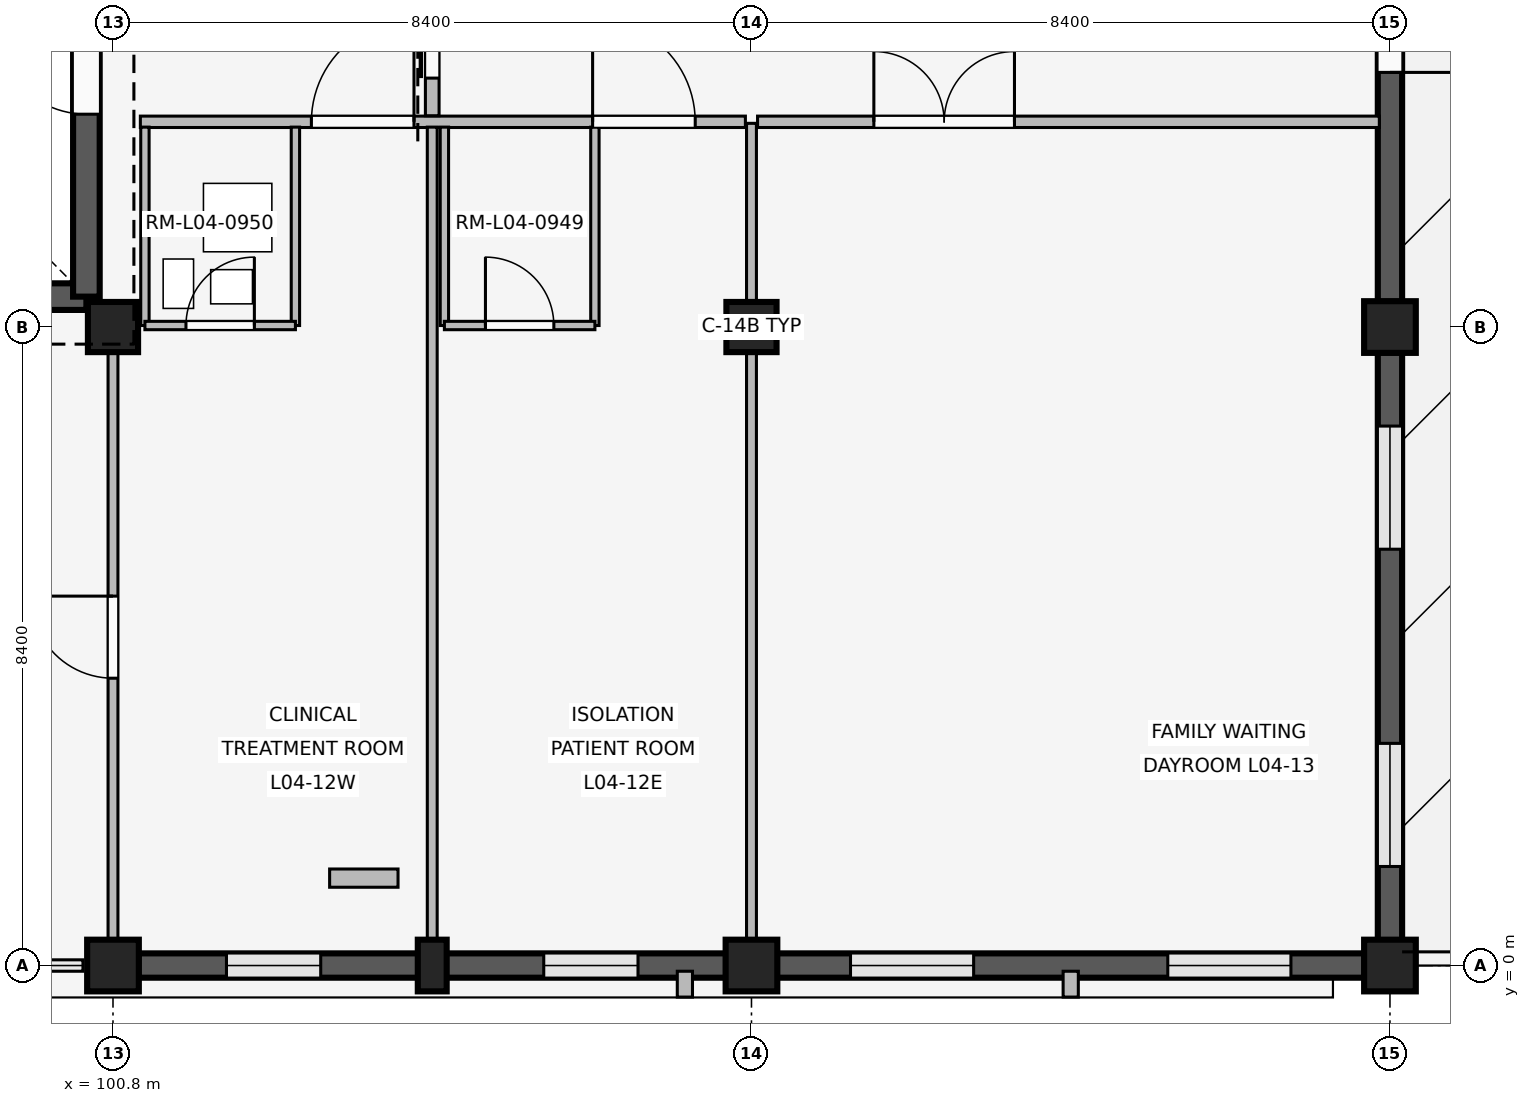
"""IFC4 building model, lengths in metres.
Left out: names, types, materials, properties, quantities, classifications, styles, units other than length and angle.
Written with IfcOpenShell. Run it as: python <this file> out.ifc"""

import sys

from ifc_helpers import new_model, si_unit, direction, frame, frame_2d, origin, origin_2d, place, context, subcontext, project, spatial, rectangle, extrude, element, fill, save


model = new_model("IFC4")
c1 = context("Model", 3, precision=1e-05, world=origin(), true_north=direction((0.0, 1.0)))
c2 = subcontext(c1, "Body", "Model", "MODEL_VIEW")
j1 = project(units=[si_unit("LENGTHUNIT", "METRE"), si_unit("PLANEANGLEUNIT", "RADIAN")], contexts=[c1])
p1 = place(None, origin())
s1 = spatial("IfcSite", under=j1, at=p1, CompositionType="ELEMENT")
p2 = place(p1, origin())
s2 = spatial("IfcBuilding", under=s1, at=p2, CompositionType="ELEMENT")
p3 = place(p2, frame((0.0, 0.0, 16.2)))
s3 = spatial("IfcBuildingStorey", under=s2, at=p3, CompositionType="ELEMENT", Elevation=16.2)
p4 = place(p3, frame((100.8, 0.0, 0.0), z_axis=(0.0, 0.0, 1.0), x_axis=(1.0, 0.0, 0.0)))
e1 = element("IfcColumn", 1, at=p4, inside=s3, PredefinedType="COLUMN", context=c2, shape_type="SweptSolid", body=[
    extrude(rectangle(XDim=0.68, YDim=0.68, at=origin_2d()), origin(), (0.0, 0.0, 1.0), 4.2),
])
p5 = place(p3, frame((100.8, 8.4, 0.0), z_axis=(0.0, 0.0, 1.0), x_axis=(1.0, 0.0, 0.0)))
e2 = element("IfcColumn", 2, at=p5, inside=s3, PredefinedType="COLUMN", context=c2, shape_type="SweptSolid", body=[
    extrude(rectangle(XDim=0.66, YDim=0.66, at=origin_2d()), origin(), (0.0, 0.0, 1.0), 4.2),
])
p6 = place(p3, frame((109.2, 0.0, 0.0), z_axis=(0.0, 0.0, 1.0), x_axis=(1.0, 0.0, 0.0)))
e3 = element("IfcColumn", 3, at=p6, inside=s3, PredefinedType="COLUMN", context=c2, shape_type="SweptSolid", body=[
    extrude(rectangle(XDim=0.68, YDim=0.68, at=origin_2d()), origin(), (0.0, 0.0, 1.0), 4.2),
])
p7 = place(p3, frame((109.2, 8.4, 0.0), z_axis=(0.0, 0.0, 1.0), x_axis=(1.0, 0.0, 0.0)))
e4 = element("IfcColumn", 4, at=p7, inside=s3, PredefinedType="COLUMN", context=c2, shape_type="SweptSolid", body=[
    extrude(rectangle(XDim=0.66, YDim=0.66, at=origin_2d()), origin(), (0.0, 0.0, 1.0), 4.2),
])
for number, where, z_axis, x_axis in (
    (5, (117.6, 0.0, 0.0), (0.0, 0.0, 1.0), (1.0, 0.0, 0.0)),
    (6, (117.6, 8.4, 0.0), (0.0, 0.0, 1.0), (1.0, 0.0, 0.0)),
):
    element("IfcColumn", number, at=place(p3, frame(where, z_axis=z_axis, x_axis=x_axis)), inside=s3, PredefinedType="COLUMN", context=c2, shape_type="SweptSolid", body=[
        extrude(rectangle(XDim=0.68, YDim=0.68, at=origin_2d()), origin(), (0.0, 0.0, 1.0), 4.2),
    ])
p8 = place(p3, frame((105.0, 0.0, 0.0), z_axis=(0.0, 0.0, 1.0), x_axis=(1.0, 0.0, 0.0)))
e7 = element("IfcColumn", 7, at=p8, inside=s3, PredefinedType="PILASTER", context=c2, shape_type="SweptSolid", body=[
    extrude(rectangle(XDim=0.38, YDim=0.68, at=origin_2d()), origin(), (0.0, 0.0, 1.0), 4.2),
])
p9 = place(p3, frame((108.865, 0.0, 0.0), z_axis=(0.0, 0.0, 1.0), x_axis=(-1.0, 0.0, 0.0)))
e8 = element("IfcWall", 8, at=p9, inside=s3, PredefinedType="SOLIDWALL", context=c2, shape_type="SweptSolid", body=[
    extrude(rectangle(XDim=7.73, YDim=0.32, at=frame_2d((3.865, 0.0))), origin(), (0.0, 0.0, 1.0), 3.32),
])
p10 = place(p9, frame((1.158, 0.0, 0.85)))
e9 = element("IfcOpeningElement", 9, at=p10, cuts=e8, PredefinedType="OPENING", context=c2, shape_type="SweptSolid", body=[
    extrude(rectangle(XDim=1.24, YDim=1.34, at=frame_2d((0.62, 0.67))), frame((0.0, 0.17, 0.0), z_axis=(0.0, -1.0, 0.0), x_axis=(1.0, 0.0, 0.0)), (0.0, 0.0, 1.0), 0.34),
])
p11 = place(p9, frame((5.332, 0.0, 0.85)))
e10 = element("IfcOpeningElement", 10, at=p11, cuts=e8, PredefinedType="OPENING", context=c2, shape_type="SweptSolid", body=[
    extrude(rectangle(XDim=1.24, YDim=1.34, at=frame_2d((0.62, 0.67))), frame((0.0, 0.17, 0.0), z_axis=(0.0, -1.0, 0.0), x_axis=(1.0, 0.0, 0.0)), (0.0, 0.0, 1.0), 0.34),
])
p12 = place(p3, frame((108.324, -0.075, 0.0), z_axis=(0.0, 0.0, 1.0), x_axis=(0.0, -1.0, 0.0)))
e11 = element("IfcWall", 11, at=p12, inside=s3, PredefinedType="ELEMENTEDWALL", context=c2, shape_type="SweptSolid", body=[
    extrude(rectangle(XDim=0.34, YDim=0.2, at=frame_2d((0.17, 0.0))), origin(), (0.0, 0.0, 1.0), 3.3),
])
p13 = place(p3, frame((117.265, 0.0, 0.0), z_axis=(0.0, 0.0, 1.0), x_axis=(-1.0, 0.0, 0.0)))
e12 = element("IfcWall", 12, at=p13, inside=s3, PredefinedType="SOLIDWALL", context=c2, shape_type="SweptSolid", body=[
    extrude(rectangle(XDim=7.73, YDim=0.32, at=frame_2d((3.865, 0.0))), origin(), (0.0, 0.0, 1.0), 3.32),
])
p14 = place(p13, frame((0.968, 0.0, 0.85)))
e13 = element("IfcOpeningElement", 13, at=p14, cuts=e12, PredefinedType="OPENING", context=c2, shape_type="SweptSolid", body=[
    extrude(rectangle(XDim=1.62, YDim=1.52, at=frame_2d((0.81, 0.76))), frame((0.0, 0.17, 0.0), z_axis=(0.0, -1.0, 0.0), x_axis=(1.0, 0.0, 0.0)), (0.0, 0.0, 1.0), 0.34),
])
p15 = place(p13, frame((5.142, 0.0, 0.85)))
e14 = element("IfcOpeningElement", 14, at=p15, cuts=e12, PredefinedType="OPENING", context=c2, shape_type="SweptSolid", body=[
    extrude(rectangle(XDim=1.62, YDim=1.52, at=frame_2d((0.81, 0.76))), frame((0.0, 0.17, 0.0), z_axis=(0.0, -1.0, 0.0), x_axis=(1.0, 0.0, 0.0)), (0.0, 0.0, 1.0), 0.34),
])
p16 = place(p3, frame((113.4, -0.075, 0.0), z_axis=(0.0, 0.0, 1.0), x_axis=(0.0, -1.0, 0.0)))
e15 = element("IfcWall", 15, at=p16, inside=s3, PredefinedType="ELEMENTEDWALL", context=c2, shape_type="SweptSolid", body=[
    extrude(rectangle(XDim=0.34, YDim=0.2, at=frame_2d((0.17, 0.0))), origin(), (0.0, 0.0, 1.0), 3.3),
])
p17 = place(p3, frame((117.6, 8.065, 0.0), z_axis=(0.0, 0.0, 1.0), x_axis=(0.0, -1.0, 0.0)))
e16 = element("IfcWall", 16, at=p17, inside=s3, PredefinedType="SOLIDWALL", context=c2, shape_type="SweptSolid", body=[
    extrude(rectangle(XDim=7.73, YDim=0.32, at=frame_2d((3.865, 0.0))), origin(), (0.0, 0.0, 1.0), 3.32),
])
p18 = place(p17, frame((0.968, 0.0, 0.85)))
e17 = element("IfcOpeningElement", 17, at=p18, cuts=e16, PredefinedType="OPENING", context=c2, shape_type="SweptSolid", body=[
    extrude(rectangle(XDim=1.62, YDim=1.52, at=frame_2d((0.81, 0.76))), frame((0.0, 0.17, 0.0), z_axis=(0.0, -1.0, 0.0), x_axis=(1.0, 0.0, 0.0)), (0.0, 0.0, 1.0), 0.34),
])
p19 = place(p17, frame((5.142, 0.0, 0.85)))
e18 = element("IfcOpeningElement", 18, at=p19, cuts=e16, PredefinedType="OPENING", context=c2, shape_type="SweptSolid", body=[
    extrude(rectangle(XDim=1.62, YDim=1.52, at=frame_2d((0.81, 0.76))), frame((0.0, 0.17, 0.0), z_axis=(0.0, -1.0, 0.0), x_axis=(1.0, 0.0, 0.0)), (0.0, 0.0, 1.0), 0.34),
])
p20 = place(p3, frame((117.6, 16.465, 0.0), z_axis=(0.0, 0.0, 1.0), x_axis=(0.0, -1.0, 0.0)))
e19 = element("IfcWall", 19, at=p20, inside=s3, PredefinedType="SOLIDWALL", context=c2, shape_type="SweptSolid", body=[
    extrude(rectangle(XDim=7.73, YDim=0.32, at=frame_2d((3.865, 0.0))), origin(), (0.0, 0.0, 1.0), 3.32),
])
p21 = place(p20, frame((3.015, 0.0, 0.0)))
e20 = element("IfcOpeningElement", 20, at=p21, cuts=e19, PredefinedType="OPENING", context=c2, shape_type="SweptSolid", body=[
    extrude(rectangle(XDim=1.7, YDim=2.3, at=frame_2d((0.85, 1.15))), frame((0.0, 0.17, 0.0), z_axis=(0.0, -1.0, 0.0), x_axis=(1.0, 0.0, 0.0)), (0.0, 0.0, 1.0), 0.34),
])
p22 = place(p3, frame((92.95, 8.8, 0.0), z_axis=(0.0, 0.0, 1.0), x_axis=(1.0, 0.0, 0.0)))
e21 = element("IfcWall", 21, at=p22, inside=s3, PredefinedType="SHEAR", context=c2, shape_type="SweptSolid", body=[
    extrude(rectangle(XDim=7.5, YDim=0.35, at=frame_2d((3.75, 0.0))), origin(), (0.0, 0.0, 1.0), 3.92),
])
p23 = place(p22, frame((4.85, 0.0, 0.0)))
e22 = element("IfcOpeningElement", 22, at=p23, cuts=e21, PredefinedType="OPENING", context=c2, shape_type="SweptSolid", body=[
    extrude(rectangle(XDim=1.2, YDim=2.2, at=frame_2d((0.6, 1.1))), frame((0.0, 0.185, 0.0), z_axis=(0.0, -1.0, 0.0), x_axis=(1.0, 0.0, 0.0)), (0.0, 0.0, 1.0), 0.37),
])
p24 = place(p3, frame((100.45, 8.8, 0.0), z_axis=(0.0, 0.0, 1.0), x_axis=(0.0, 1.0, 0.0)))
e23 = element("IfcWall", 23, at=p24, inside=s3, PredefinedType="SHEAR", context=c2, shape_type="SweptSolid", body=[
    extrude(rectangle(XDim=7.55, YDim=0.35, at=frame_2d((3.775, 0.0))), origin(), (0.0, 0.0, 1.0), 3.92),
])
p25 = place(p24, frame((2.4, 0.0, 0.0)))
e24 = element("IfcOpeningElement", 24, at=p25, cuts=e23, PredefinedType="OPENING", context=c2, shape_type="SweptSolid", body=[
    extrude(rectangle(XDim=1.2, YDim=2.2, at=frame_2d((0.6, 1.1))), frame((0.0, 0.185, 0.0), z_axis=(0.0, -1.0, 0.0), x_axis=(1.0, 0.0, 0.0)), (0.0, 0.0, 1.0), 0.37),
])
p26 = place(p3, frame((100.8, 0.14, 0.0), z_axis=(0.0, 0.0, 1.0), x_axis=(0.0, 1.0, 0.0)))
e25 = element("IfcWall", 25, at=p26, inside=s3, PredefinedType="PARTITIONING", context=c2, shape_type="SweptSolid", body=[
    extrude(rectangle(XDim=8.21, YDim=0.13, at=frame_2d((4.105, 0.0))), origin(), (0.0, 0.0, 1.0), 3.3),
])
p27 = place(p26, frame((3.64, 0.0, 0.0)))
e26 = element("IfcOpeningElement", 26, at=p27, cuts=e25, PredefinedType="OPENING", context=c2, shape_type="SweptSolid", body=[
    extrude(rectangle(XDim=1.08, YDim=2.15, at=frame_2d((0.54, 1.075))), frame((0.0, 0.075, 0.0), z_axis=(0.0, -1.0, 0.0), x_axis=(1.0, 0.0, 0.0)), (0.0, 0.0, 1.0), 0.15),
])
p28 = place(p3, frame((101.16, 11.1, 0.0), z_axis=(0.0, 0.0, 1.0), x_axis=(1.0, 0.0, 0.0)))
e27 = element("IfcWall", 27, at=p28, inside=s3, PredefinedType="PARTITIONING", context=c2, shape_type="SweptSolid", body=[
    extrude(rectangle(XDim=7.96, YDim=0.15, at=frame_2d((3.98, 0.0))), origin(), (0.0, 0.0, 1.0), 3.3),
])
p29 = place(p28, frame((2.25, 0.0, 0.0)))
e28 = element("IfcOpeningElement", 28, at=p29, cuts=e27, PredefinedType="OPENING", context=c2, shape_type="SweptSolid", body=[
    extrude(rectangle(XDim=1.35, YDim=2.25, at=frame_2d((0.675, 1.125))), frame((0.0, 0.085, 0.0), z_axis=(0.0, -1.0, 0.0), x_axis=(1.0, 0.0, 0.0)), (0.0, 0.0, 1.0), 0.17),
])
p30 = place(p28, frame((5.95, 0.0, 0.0)))
e29 = element("IfcOpeningElement", 29, at=p30, cuts=e27, PredefinedType="OPENING", context=c2, shape_type="SweptSolid", body=[
    extrude(rectangle(XDim=1.35, YDim=2.25, at=frame_2d((0.675, 1.125))), frame((0.0, 0.085, 0.0), z_axis=(0.0, -1.0, 0.0), x_axis=(1.0, 0.0, 0.0)), (0.0, 0.0, 1.0), 0.17),
])
p31 = place(p3, frame((105.0, 0.1, 0.0), z_axis=(0.0, 0.0, 1.0), x_axis=(0.0, 1.0, 0.0)))
e30 = element("IfcWall", 30, at=p31, inside=s3, PredefinedType="PARTITIONING", context=c2, shape_type="SweptSolid", body=[
    extrude(rectangle(XDim=10.93, YDim=0.13, at=frame_2d((5.465, 0.0))), origin(), (0.0, 0.0, 1.0), 3.3),
])
for number, where, z_axis, x_axis in (
    (31, (101.22, 8.42, 0.0), (0.0, 0.0, 1.0), (0.0, 1.0, 0.0)),
    (32, (103.2, 8.42, 0.0), (0.0, 0.0, 1.0), (0.0, 1.0, 0.0)),
):
    element("IfcWall", number, at=place(p3, frame(where, z_axis=z_axis, x_axis=x_axis)), inside=s3, PredefinedType="PARTITIONING", context=c2, shape_type="SweptSolid", body=[
        extrude(rectangle(XDim=2.61, YDim=0.11, at=frame_2d((1.305, 0.0))), origin(), (0.0, 0.0, 1.0), 3.3),
    ])
p32 = place(p3, frame((101.22, 8.42, 0.0), z_axis=(0.0, 0.0, 1.0), x_axis=(1.0, 0.0, 0.0)))
e33 = element("IfcWall", 33, at=p32, inside=s3, PredefinedType="PARTITIONING", context=c2, shape_type="SweptSolid", body=[
    extrude(rectangle(XDim=1.98, YDim=0.11, at=frame_2d((0.99, 0.0))), origin(), (0.0, 0.0, 1.0), 3.3),
])
p33 = place(p32, frame((0.54, 0.0, 0.0)))
e34 = element("IfcOpeningElement", 34, at=p33, cuts=e33, PredefinedType="OPENING", context=c2, shape_type="SweptSolid", body=[
    extrude(rectangle(XDim=0.9, YDim=2.1, at=frame_2d((0.45, 1.05))), frame((0.0, 0.065, 0.0), z_axis=(0.0, -1.0, 0.0), x_axis=(1.0, 0.0, 0.0)), (0.0, 0.0, 1.0), 0.13),
])
for number, where, z_axis, x_axis in (
    (35, (105.16, 8.42, 0.0), (0.0, 0.0, 1.0), (0.0, 1.0, 0.0)),
    (36, (107.14, 8.42, 0.0), (0.0, 0.0, 1.0), (0.0, 1.0, 0.0)),
):
    element("IfcWall", number, at=place(p3, frame(where, z_axis=z_axis, x_axis=x_axis)), inside=s3, PredefinedType="PARTITIONING", context=c2, shape_type="SweptSolid", body=[
        extrude(rectangle(XDim=2.61, YDim=0.11, at=frame_2d((1.305, 0.0))), origin(), (0.0, 0.0, 1.0), 3.3),
    ])
p34 = place(p3, frame((105.16, 8.42, 0.0), z_axis=(0.0, 0.0, 1.0), x_axis=(1.0, 0.0, 0.0)))
e37 = element("IfcWall", 37, at=p34, inside=s3, PredefinedType="PARTITIONING", context=c2, shape_type="SweptSolid", body=[
    extrude(rectangle(XDim=1.98, YDim=0.11, at=frame_2d((0.99, 0.0))), origin(), (0.0, 0.0, 1.0), 3.3),
])
p35 = place(p34, frame((0.54, 0.0, 0.0)))
e38 = element("IfcOpeningElement", 38, at=p35, cuts=e37, PredefinedType="OPENING", context=c2, shape_type="SweptSolid", body=[
    extrude(rectangle(XDim=0.9, YDim=2.1, at=frame_2d((0.45, 1.05))), frame((0.0, 0.065, 0.0), z_axis=(0.0, -1.0, 0.0), x_axis=(1.0, 0.0, 0.0)), (0.0, 0.0, 1.0), 0.13),
])
p36 = place(p3, frame((103.65, 1.15, 0.0), z_axis=(0.0, 0.0, 1.0), x_axis=(1.0, 0.0, 0.0)))
e39 = element("IfcWall", 39, at=p36, inside=s3, PredefinedType="PLUMBINGWALL", context=c2, shape_type="SweptSolid", body=[
    extrude(rectangle(XDim=0.9, YDim=0.24, at=frame_2d((0.45, 0.0))), origin(), (0.0, 0.0, 1.0), 3.3),
])
p37 = place(p3, frame((105.0, 11.18, 0.0), z_axis=(0.0, 0.0, 1.0), x_axis=(0.0, 1.0, 0.0)))
e40 = element("IfcWall", 40, at=p37, inside=s3, PredefinedType="PARTITIONING", context=c2, shape_type="SweptSolid", body=[
    extrude(rectangle(XDim=2.84, YDim=0.18, at=frame_2d((1.42, 0.0))), origin(), (0.0, 0.0, 1.0), 3.3),
])
p38 = place(p37, frame((0.495, 0.0, 0.0)))
e41 = element("IfcOpeningElement", 41, at=p38, cuts=e40, PredefinedType="OPENING", context=c2, shape_type="SweptSolid", body=[
    extrude(rectangle(XDim=1.85, YDim=2.3, at=frame_2d((0.925, 1.15))), frame((0.0, 0.1, 0.0), z_axis=(0.0, -1.0, 0.0), x_axis=(1.0, 0.0, 0.0)), (0.0, 0.0, 1.0), 0.2),
])
p39 = place(p3, frame((109.2, 0.14, 0.0), z_axis=(0.0, 0.0, 1.0), x_axis=(0.0, 1.0, 0.0)))
e42 = element("IfcWall", 42, at=p39, inside=s3, PredefinedType="PARTITIONING", context=c2, shape_type="SweptSolid", body=[
    extrude(rectangle(XDim=10.94, YDim=0.13, at=frame_2d((5.47, 0.0))), origin(), (0.0, 0.0, 1.0), 3.3),
])
p40 = place(p3, frame((109.28, 11.1, 0.0), z_axis=(0.0, 0.0, 1.0), x_axis=(1.0, 0.0, 0.0)))
e43 = element("IfcWall", 43, at=p40, inside=s3, PredefinedType="PARTITIONING", context=c2, shape_type="SweptSolid", body=[
    extrude(rectangle(XDim=8.18, YDim=0.15, at=frame_2d((4.09, 0.0))), origin(), (0.0, 0.0, 1.0), 3.3),
])
p41 = place(p40, frame((1.53, 0.0, 0.0)))
e44 = element("IfcOpeningElement", 44, at=p41, cuts=e43, PredefinedType="OPENING", context=c2, shape_type="SweptSolid", body=[
    extrude(rectangle(XDim=1.85, YDim=2.3, at=frame_2d((0.925, 1.15))), frame((0.0, 0.085, 0.0), z_axis=(0.0, -1.0, 0.0), x_axis=(1.0, 0.0, 0.0)), (0.0, 0.0, 1.0), 0.17),
])
p42 = place(p10, origin())
e45 = element("IfcWindow", 45, at=p42, inside=s3, PartitioningType="SINGLE_PANEL", PredefinedType="WINDOW", context=c2, shape_type="SweptSolid", body=[
    extrude(rectangle(XDim=1.24, YDim=1.34, at=frame_2d((0.62, 0.67))), frame((0.0, 0.03, 0.0), z_axis=(0.0, -1.0, 0.0), x_axis=(1.0, 0.0, 0.0)), (0.0, 0.0, 1.0), 0.06),
])
fill(e9, e45)
p43 = place(p11, origin())
e46 = element("IfcWindow", 46, at=p43, inside=s3, PartitioningType="SINGLE_PANEL", PredefinedType="WINDOW", context=c2, shape_type="SweptSolid", body=[
    extrude(rectangle(XDim=1.24, YDim=1.34, at=frame_2d((0.62, 0.67))), frame((0.0, 0.03, 0.0), z_axis=(0.0, -1.0, 0.0), x_axis=(1.0, 0.0, 0.0)), (0.0, 0.0, 1.0), 0.06),
])
fill(e10, e46)
p44 = place(p14, origin())
e47 = element("IfcWindow", 47, at=p44, inside=s3, PartitioningType="SINGLE_PANEL", PredefinedType="WINDOW", context=c2, shape_type="SweptSolid", body=[
    extrude(rectangle(XDim=1.62, YDim=1.52, at=frame_2d((0.81, 0.76))), frame((0.0, 0.03, 0.0), z_axis=(0.0, -1.0, 0.0), x_axis=(1.0, 0.0, 0.0)), (0.0, 0.0, 1.0), 0.06),
])
fill(e13, e47)
p45 = place(p15, origin())
e48 = element("IfcWindow", 48, at=p45, inside=s3, PartitioningType="SINGLE_PANEL", PredefinedType="WINDOW", context=c2, shape_type="SweptSolid", body=[
    extrude(rectangle(XDim=1.62, YDim=1.52, at=frame_2d((0.81, 0.76))), frame((0.0, 0.03, 0.0), z_axis=(0.0, -1.0, 0.0), x_axis=(1.0, 0.0, 0.0)), (0.0, 0.0, 1.0), 0.06),
])
fill(e14, e48)
p46 = place(p18, origin())
e49 = element("IfcWindow", 49, at=p46, inside=s3, PartitioningType="SINGLE_PANEL", PredefinedType="WINDOW", context=c2, shape_type="SweptSolid", body=[
    extrude(rectangle(XDim=1.62, YDim=1.52, at=frame_2d((0.81, 0.76))), frame((0.0, 0.03, 0.0), z_axis=(0.0, -1.0, 0.0), x_axis=(1.0, 0.0, 0.0)), (0.0, 0.0, 1.0), 0.06),
])
fill(e17, e49)
p47 = place(p19, origin())
e50 = element("IfcWindow", 50, at=p47, inside=s3, PartitioningType="SINGLE_PANEL", PredefinedType="WINDOW", context=c2, shape_type="SweptSolid", body=[
    extrude(rectangle(XDim=1.62, YDim=1.52, at=frame_2d((0.81, 0.76))), frame((0.0, 0.03, 0.0), z_axis=(0.0, -1.0, 0.0), x_axis=(1.0, 0.0, 0.0)), (0.0, 0.0, 1.0), 0.06),
])
fill(e18, e50)
p48 = place(p21, origin())
e51 = element("IfcDoor", 51, at=p48, inside=s3, OperationType="DOUBLE_SWING_LEFT", PredefinedType="DOOR", context=c2, shape_type="SweptSolid", body=[
    extrude(rectangle(XDim=1.7, YDim=2.3, at=frame_2d((0.85, 1.15))), frame((0.0, 0.025, 0.0), z_axis=(0.0, -1.0, 0.0), x_axis=(1.0, 0.0, 0.0)), (0.0, 0.0, 1.0), 0.05),
])
fill(e20, e51)
p49 = place(p25, origin())
e52 = element("IfcDoor", 52, at=p49, inside=s3, OperationType="SINGLE_SWING_RIGHT", PredefinedType="DOOR", context=c2, shape_type="SweptSolid", body=[
    extrude(rectangle(XDim=1.2, YDim=2.2, at=frame_2d((0.6, 1.1))), frame((0.0, 0.025, 0.0), z_axis=(0.0, -1.0, 0.0), x_axis=(1.0, 0.0, 0.0)), (0.0, 0.0, 1.0), 0.05),
])
fill(e24, e52)
p50 = place(p27, origin())
e53 = element("IfcDoor", 53, at=p50, inside=s3, OperationType="SINGLE_SWING_RIGHT", PredefinedType="DOOR", context=c2, shape_type="SweptSolid", body=[
    extrude(rectangle(XDim=1.08, YDim=2.15, at=frame_2d((0.54, 1.075))), frame((0.0, 0.025, 0.0), z_axis=(0.0, -1.0, 0.0), x_axis=(1.0, 0.0, 0.0)), (0.0, 0.0, 1.0), 0.05),
])
fill(e26, e53)
p51 = place(p29, origin())
e54 = element("IfcDoor", 54, at=p51, inside=s3, OperationType="SINGLE_SWING_RIGHT", PredefinedType="DOOR", context=c2, shape_type="SweptSolid", body=[
    extrude(rectangle(XDim=1.35, YDim=2.25, at=frame_2d((0.675, 1.125))), frame((0.0, 0.025, 0.0), z_axis=(0.0, -1.0, 0.0), x_axis=(1.0, 0.0, 0.0)), (0.0, 0.0, 1.0), 0.05),
])
fill(e28, e54)
p52 = place(p30, origin())
e55 = element("IfcDoor", 55, at=p52, inside=s3, OperationType="SINGLE_SWING_LEFT", PredefinedType="DOOR", context=c2, shape_type="SweptSolid", body=[
    extrude(rectangle(XDim=1.35, YDim=2.25, at=frame_2d((0.675, 1.125))), frame((0.0, 0.025, 0.0), z_axis=(0.0, -1.0, 0.0), x_axis=(1.0, 0.0, 0.0)), (0.0, 0.0, 1.0), 0.05),
])
fill(e29, e55)
p53 = place(p33, origin())
e56 = element("IfcDoor", 56, at=p53, inside=s3, OperationType="SINGLE_SWING_RIGHT", PredefinedType="DOOR", context=c2, shape_type="SweptSolid", body=[
    extrude(rectangle(XDim=0.9, YDim=2.1, at=frame_2d((0.45, 1.05))), frame((0.0, 0.025, 0.0), z_axis=(0.0, -1.0, 0.0), x_axis=(1.0, 0.0, 0.0)), (0.0, 0.0, 1.0), 0.05),
])
fill(e34, e56)
p54 = place(p35, origin())
e57 = element("IfcDoor", 57, at=p54, inside=s3, OperationType="SINGLE_SWING_LEFT", PredefinedType="DOOR", context=c2, shape_type="SweptSolid", body=[
    extrude(rectangle(XDim=0.9, YDim=2.1, at=frame_2d((0.45, 1.05))), frame((0.0, 0.025, 0.0), z_axis=(0.0, -1.0, 0.0), x_axis=(1.0, 0.0, 0.0)), (0.0, 0.0, 1.0), 0.05),
])
fill(e38, e57)
p55 = place(p38, origin())
e58 = element("IfcDoor", 58, at=p55, inside=s3, OperationType="SLIDING_TO_LEFT", PredefinedType="DOOR", context=c2, shape_type="SweptSolid", body=[
    extrude(rectangle(XDim=1.85, YDim=2.3, at=frame_2d((0.925, 1.15))), frame((0.0, 0.025, 0.0), z_axis=(0.0, -1.0, 0.0), x_axis=(1.0, 0.0, 0.0)), (0.0, 0.0, 1.0), 0.05),
])
fill(e41, e58)
p56 = place(p41, origin())
e59 = element("IfcDoor", 59, at=p56, inside=s3, OperationType="DOUBLE_SWING_LEFT", PredefinedType="DOOR", context=c2, shape_type="SweptSolid", body=[
    extrude(rectangle(XDim=1.85, YDim=2.3, at=frame_2d((0.925, 1.15))), frame((0.0, 0.025, 0.0), z_axis=(0.0, -1.0, 0.0), x_axis=(1.0, 0.0, 0.0)), (0.0, 0.0, 1.0), 0.05),
])
fill(e44, e59)
save(model, sys.argv[1])
